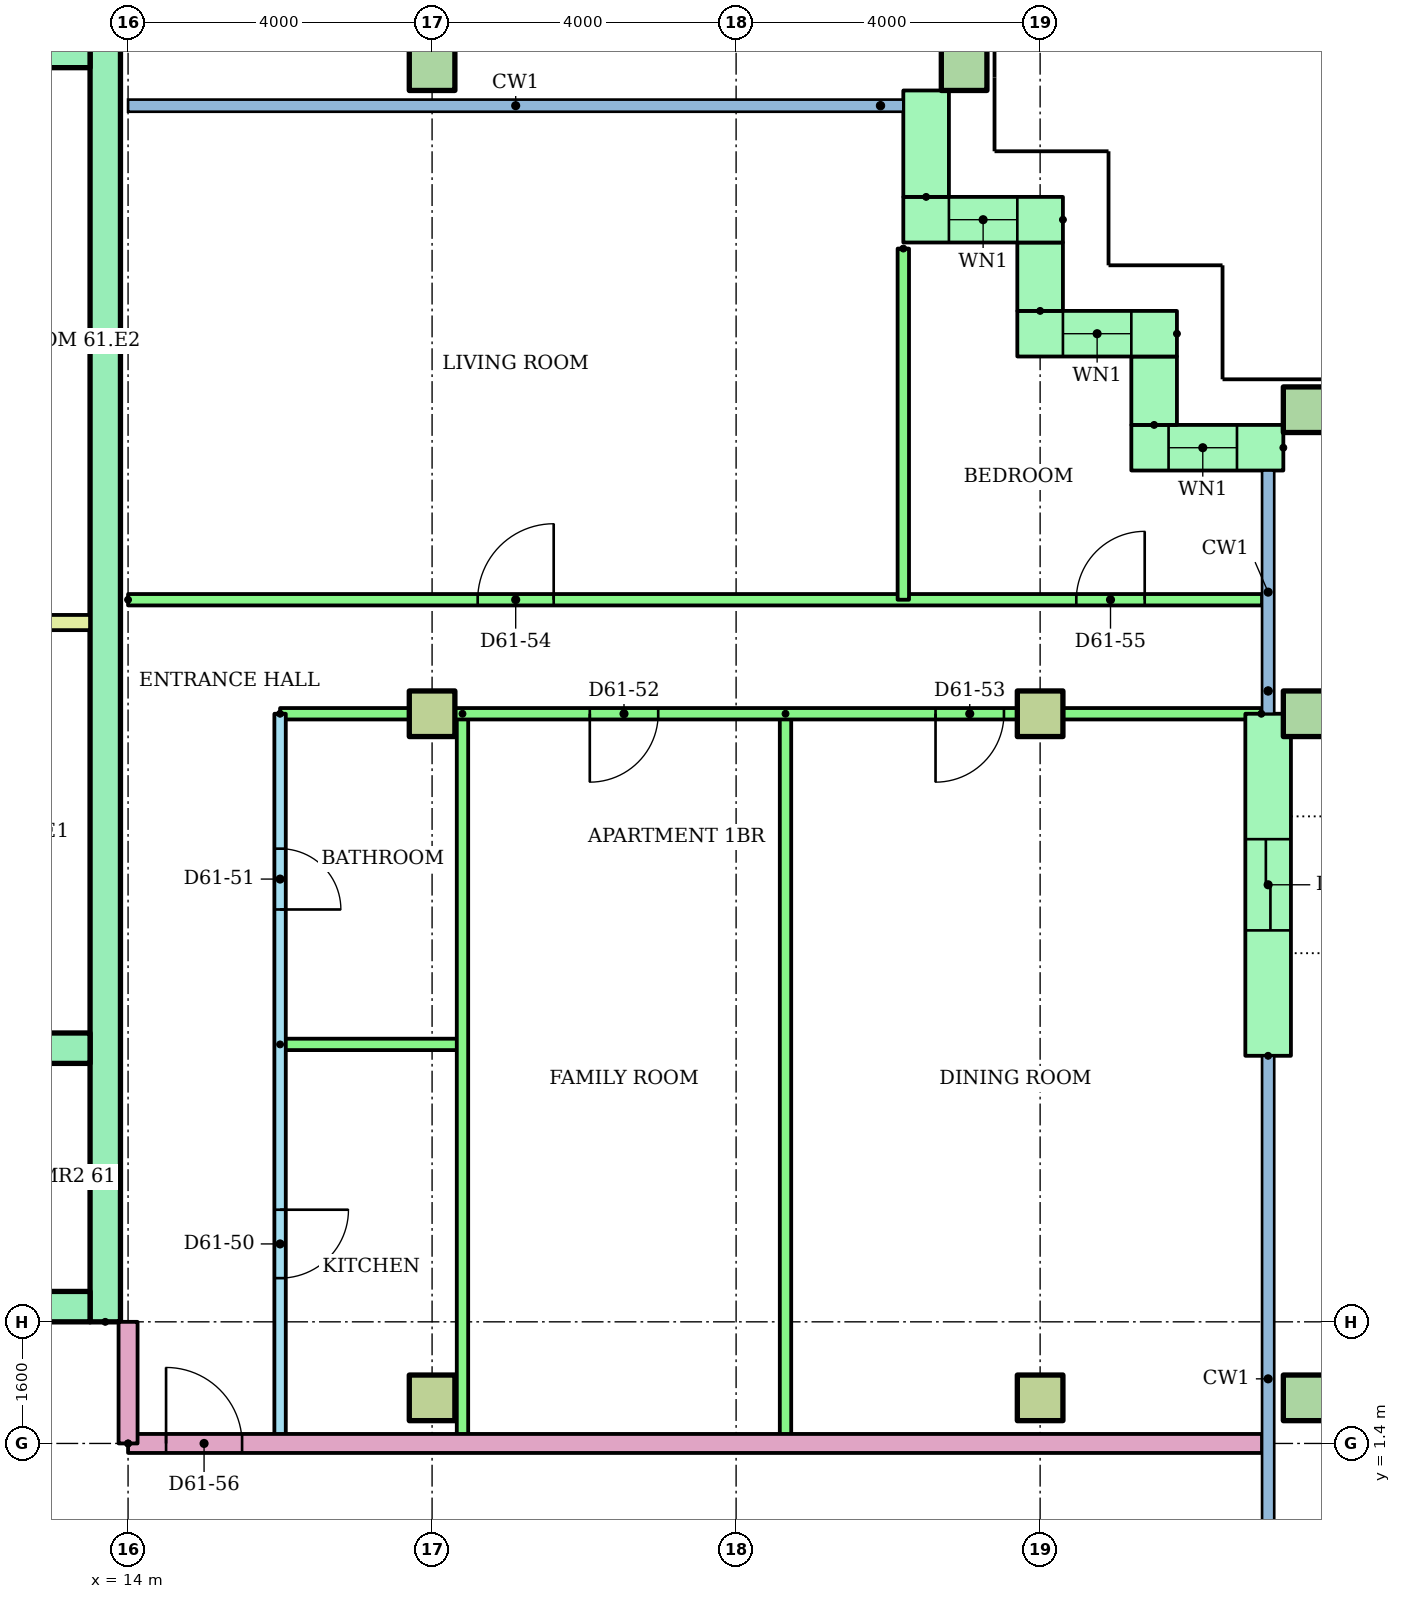
"""IFC4 building model, lengths in metres.
Left out: names, types, materials, properties, quantities, classifications, styles, units other than length and angle.
Written with IfcOpenShell. Run it as: python <this file> out.ifc"""

import sys

from ifc_helpers import new_model, si_unit, direction, frame, frame_2d, origin, origin_2d, place, context, subcontext, project, spatial, rectangle, hollow_rectangle, extrude, element, fill, save


model = new_model("IFC4")
c1 = context("Model", 3, precision=1e-05, world=origin(), true_north=direction((0.0, 1.0)))
c2 = subcontext(c1, "Body", "Model", "MODEL_VIEW")
j1 = project(units=[si_unit("LENGTHUNIT", "METRE"), si_unit("PLANEANGLEUNIT", "RADIAN")], contexts=[c1])
p1 = place(None, origin())
s1 = spatial("IfcSite", under=j1, at=p1, CompositionType="ELEMENT")
p2 = place(p1, origin())
s2 = spatial("IfcBuilding", under=s1, at=p2, CompositionType="ELEMENT")
p3 = place(p2, frame((0.0, 0.0, 233.2)))
s3 = spatial("IfcBuildingStorey", under=s2, at=p3, CompositionType="ELEMENT", Elevation=233.2)
for number, where in (
    (1, (18.0, 2.0, 0.0)),
    (2, (26.0, 2.0, 0.0)),
):
    element("IfcColumn", number, at=place(p3, frame(where)), inside=s3, PredefinedType="COLUMN", context=c2, shape_type="SweptSolid", body=[
        extrude(rectangle(XDim=0.6, YDim=0.6, at=origin_2d()), origin(), (0.0, 0.0, 1.0), 3.2),
    ])
p4 = place(p3, frame((29.5, 2.0, 0.0)))
e3 = element("IfcColumn", 3, at=p4, inside=s3, PredefinedType="COLUMN", context=c2, shape_type="SweptSolid", body=[
    extrude(hollow_rectangle(XDim=0.6, YDim=0.6, WallThickness=0.03, at=origin_2d()), origin(), (0.0, 0.0, 1.0), 3.2),
])
for number, where in (
    (4, (18.0, 11.0, 0.0)),
    (5, (26.0, 11.0, 0.0)),
):
    element("IfcColumn", number, at=place(p3, frame(where)), inside=s3, PredefinedType="COLUMN", context=c2, shape_type="SweptSolid", body=[
        extrude(rectangle(XDim=0.6, YDim=0.6, at=origin_2d()), origin(), (0.0, 0.0, 1.0), 3.2),
    ])
for number, where in (
    (6, (29.5, 11.0, 0.0)),
    (7, (29.5, 15.0, 0.0)),
    (8, (18.0, 19.5, 0.0)),
    (9, (25.0, 19.5, 0.0)),
):
    element("IfcColumn", number, at=place(p3, frame(where)), inside=s3, PredefinedType="COLUMN", context=c2, shape_type="SweptSolid", body=[
        extrude(hollow_rectangle(XDim=0.6, YDim=0.6, WallThickness=0.03, at=origin_2d()), origin(), (0.0, 0.0, 1.0), 3.2),
    ])
p5 = place(p3, frame((29.2, 14.5, 0.0), z_axis=(0.0, 0.0, 1.0), x_axis=(-1.0, 0.0, 0.0)))
e10 = element("IfcWall", 10, at=p5, inside=s3, PredefinedType="STANDARD", context=c2, shape_type="SweptSolid", body=[
    extrude(rectangle(XDim=2.0, YDim=0.6, at=frame_2d((1.0, 0.0))), origin(), (0.0, 0.0, 1.0), 2.92),
])
p6 = place(p5, frame((0.61, 0.0, 0.9)))
e11 = element("IfcOpeningElement", 11, at=p6, cuts=e10, PredefinedType="OPENING", context=c2, shape_type="SweptSolid", body=[
    extrude(rectangle(XDim=0.9, YDim=1.5, at=frame_2d((0.45, 0.75))), frame((0.0, 0.31, 0.0), z_axis=(0.0, -1.0, 0.0), x_axis=(1.0, 0.0, 0.0)), (0.0, 0.0, 1.0), 0.62),
])
p7 = place(p3, frame((27.5, 14.8, 0.0), z_axis=(0.0, 0.0, 1.0), x_axis=(0.0, 1.0, 0.0)))
e12 = element("IfcWall", 12, at=p7, inside=s3, PredefinedType="STANDARD", context=c2, shape_type="SweptSolid", body=[
    extrude(rectangle(XDim=0.9, YDim=0.6, at=frame_2d((0.45, 0.0))), origin(), (0.0, 0.0, 1.0), 2.92),
])
p8 = place(p3, frame((27.8, 16.0, 0.0), z_axis=(0.0, 0.0, 1.0), x_axis=(-1.0, 0.0, 0.0)))
e13 = element("IfcWall", 13, at=p8, inside=s3, PredefinedType="STANDARD", context=c2, shape_type="SweptSolid", body=[
    extrude(rectangle(XDim=2.1, YDim=0.6, at=frame_2d((1.05, 0.0))), origin(), (0.0, 0.0, 1.0), 2.92),
])
p9 = place(p8, frame((0.6, 0.0, 0.9)))
e14 = element("IfcOpeningElement", 14, at=p9, cuts=e13, PredefinedType="OPENING", context=c2, shape_type="SweptSolid", body=[
    extrude(rectangle(XDim=0.9, YDim=1.5, at=frame_2d((0.45, 0.75))), frame((0.0, 0.31, 0.0), z_axis=(0.0, -1.0, 0.0), x_axis=(1.0, 0.0, 0.0)), (0.0, 0.0, 1.0), 0.62),
])
p10 = place(p3, frame((26.0, 16.3, 0.0), z_axis=(0.0, 0.0, 1.0), x_axis=(0.0, 1.0, 0.0)))
e15 = element("IfcWall", 15, at=p10, inside=s3, PredefinedType="STANDARD", context=c2, shape_type="SweptSolid", body=[
    extrude(rectangle(XDim=0.9, YDim=0.6, at=frame_2d((0.45, 0.0))), origin(), (0.0, 0.0, 1.0), 2.92),
])
p11 = place(p3, frame((26.3, 17.5, 0.0), z_axis=(0.0, 0.0, 1.0), x_axis=(-1.0, 0.0, 0.0)))
e16 = element("IfcWall", 16, at=p11, inside=s3, PredefinedType="STANDARD", context=c2, shape_type="SweptSolid", body=[
    extrude(rectangle(XDim=2.1, YDim=0.6, at=frame_2d((1.05, 0.0))), origin(), (0.0, 0.0, 1.0), 2.92),
])
p12 = place(p11, frame((0.6, 0.0, 0.9)))
e17 = element("IfcOpeningElement", 17, at=p12, cuts=e16, PredefinedType="OPENING", context=c2, shape_type="SweptSolid", body=[
    extrude(rectangle(XDim=0.9, YDim=1.5, at=frame_2d((0.45, 0.75))), frame((0.0, 0.31, 0.0), z_axis=(0.0, -1.0, 0.0), x_axis=(1.0, 0.0, 0.0)), (0.0, 0.0, 1.0), 0.62),
])
p13 = place(p3, frame((24.5, 17.8, 0.0), z_axis=(0.0, 0.0, 1.0), x_axis=(0.0, 1.0, 0.0)))
e18 = element("IfcWall", 18, at=p13, inside=s3, PredefinedType="STANDARD", context=c2, shape_type="SweptSolid", body=[
    extrude(rectangle(XDim=1.4, YDim=0.6, at=frame_2d((0.7, 0.0))), origin(), (0.0, 0.0, 1.0), 2.92),
])
p14 = place(p3, frame((29.0, 6.5, 0.0), z_axis=(0.0, 0.0, 1.0), x_axis=(0.0, 1.0, 0.0)))
e19 = element("IfcWall", 19, at=p14, inside=s3, PredefinedType="STANDARD", context=c2, shape_type="SweptSolid", body=[
    extrude(rectangle(XDim=4.5, YDim=0.6, at=frame_2d((2.25, 0.0))), origin(), (0.0, 0.0, 1.0), 2.92),
])
p15 = place(p14, frame((1.65, 0.0, 0.0)))
e20 = element("IfcOpeningElement", 20, at=p15, cuts=e19, PredefinedType="OPENING", context=c2, shape_type="SweptSolid", body=[
    extrude(rectangle(XDim=1.2, YDim=2.1, at=frame_2d((0.6, 1.05))), frame((0.0, 0.31, 0.0), z_axis=(0.0, -1.0, 0.0), x_axis=(1.0, 0.0, 0.0)), (0.0, 0.0, 1.0), 0.62),
])
p16 = place(p3, frame((13.7, 3.0, 0.0), z_axis=(0.0, 0.0, 1.0), x_axis=(0.0, 1.0, 0.0)))
e21 = element("IfcWall", 21, at=p16, inside=s3, PredefinedType="SHEAR", context=c2, shape_type="SweptSolid", body=[
    extrude(rectangle(XDim=17.0, YDim=0.4, at=frame_2d((8.5, 0.0))), origin(), (0.0, 0.0, 1.0), 2.92),
])
p17 = place(p3, frame((-13.5, 19.7, 0.0)))
e22 = element("IfcWall", 22, at=p17, inside=s3, PredefinedType="SHEAR", context=c2, shape_type="SweptSolid", body=[
    extrude(rectangle(XDim=27.0, YDim=0.4, at=frame_2d((13.5, 0.0))), origin(), (0.0, 0.0, 1.0), 2.92),
])
p18 = place(p3, frame((-13.5, 3.2, 0.0)))
e23 = element("IfcWall", 23, at=p18, inside=s3, PredefinedType="SHEAR", context=c2, shape_type="SweptSolid", body=[
    extrude(rectangle(XDim=27.0, YDim=0.4, at=frame_2d((13.5, 0.0))), origin(), (0.0, 0.0, 1.0), 2.92),
])
p19 = place(p18, frame((22.083, 0.0, 0.0)))
e24 = element("IfcOpeningElement", 24, at=p19, cuts=e23, PredefinedType="OPENING", context=c2, shape_type="SweptSolid", body=[
    extrude(rectangle(XDim=1.1, YDim=2.1, at=frame_2d((0.55, 1.05))), frame((0.0, 0.21, 0.0), z_axis=(0.0, -1.0, 0.0), x_axis=(1.0, 0.0, 0.0)), (0.0, 0.0, 1.0), 0.42),
])
p20 = place(p18, frame((25.128, 0.0, 0.0)))
e25 = element("IfcOpeningElement", 25, at=p20, cuts=e23, PredefinedType="OPENING", context=c2, shape_type="SweptSolid", body=[
    extrude(rectangle(XDim=1.1, YDim=2.1, at=frame_2d((0.55, 1.05))), frame((0.0, 0.21, 0.0), z_axis=(0.0, -1.0, 0.0), x_axis=(1.0, 0.0, 0.0)), (0.0, 0.0, 1.0), 0.42),
])
p21 = place(p18, frame((12.6, 0.0, 0.0)))
e26 = element("IfcOpeningElement", 26, at=p21, cuts=e23, PredefinedType="OPENING", context=c2, shape_type="SweptSolid", body=[
    extrude(rectangle(XDim=1.8, YDim=2.1, at=frame_2d((0.9, 1.05))), frame((0.0, 0.21, 0.0), z_axis=(0.0, -1.0, 0.0), x_axis=(1.0, 0.0, 0.0)), (0.0, 0.0, 1.0), 0.42),
])
p22 = place(p3, frame((1.522, 6.6, 0.0)))
e27 = element("IfcWall", 27, at=p22, inside=s3, PredefinedType="SHEAR", context=c2, shape_type="SweptSolid", body=[
    extrude(rectangle(XDim=11.978, YDim=0.4, at=frame_2d((5.989, 0.0))), origin(), (0.0, 0.0, 1.0), 2.92),
])
p23 = place(p22, frame((2.544, 0.0, 0.0)))
e28 = element("IfcOpeningElement", 28, at=p23, cuts=e27, PredefinedType="OPENING", context=c2, shape_type="SweptSolid", body=[
    extrude(rectangle(XDim=1.0, YDim=2.1, at=frame_2d((0.5, 1.05))), frame((0.0, 0.21, 0.0), z_axis=(0.0, -1.0, 0.0), x_axis=(1.0, 0.0, 0.0)), (0.0, 0.0, 1.0), 0.42),
])
p24 = place(p3, frame((9.6, 12.2, 0.0)))
e29 = element("IfcWall", 29, at=p24, inside=s3, PredefinedType="PARTITIONING", context=c2, shape_type="SweptSolid", body=[
    extrude(rectangle(XDim=3.9, YDim=0.2, at=frame_2d((1.95, 0.0))), origin(), (0.0, 0.0, 1.0), 2.92),
])
p25 = place(p3, frame((16.0, 11.0, 0.0), z_axis=(0.0, 0.0, 1.0), x_axis=(0.0, -1.0, 0.0)))
e30 = element("IfcWall", 30, at=p25, inside=s3, PredefinedType="PARTITIONING", context=c2, shape_type="SweptSolid", body=[
    extrude(rectangle(XDim=9.6, YDim=0.15, at=frame_2d((4.8, 0.0))), origin(), (0.0, 0.0, 1.0), 2.4),
])
p26 = place(p25, frame((6.525, 0.0, 0.0)))
e31 = element("IfcOpeningElement", 31, at=p26, cuts=e30, PredefinedType="OPENING", context=c2, shape_type="SweptSolid", body=[
    extrude(rectangle(XDim=0.9, YDim=2.1, at=frame_2d((0.45, 1.05))), frame((0.0, 0.085, 0.0), z_axis=(0.0, -1.0, 0.0), x_axis=(1.0, 0.0, 0.0)), (0.0, 0.0, 1.0), 0.17),
])
p27 = place(p25, frame((1.775, 0.0, 0.0)))
e32 = element("IfcOpeningElement", 32, at=p27, cuts=e30, PredefinedType="OPENING", context=c2, shape_type="SweptSolid", body=[
    extrude(rectangle(XDim=0.8, YDim=2.1, at=frame_2d((0.4, 1.05))), frame((0.0, 0.085, 0.0), z_axis=(0.0, -1.0, 0.0), x_axis=(1.0, 0.0, 0.0)), (0.0, 0.0, 1.0), 0.17),
])
p28 = place(p3, frame((16.0, 6.65, 0.0)))
e33 = element("IfcWall", 33, at=p28, inside=s3, PredefinedType="PARTITIONING", context=c2, shape_type="SweptSolid", body=[
    extrude(rectangle(XDim=2.4, YDim=0.15, at=frame_2d((1.2, 0.0))), origin(), (0.0, 0.0, 1.0), 2.4),
])
for number, where, z_axis, x_axis in (
    (34, (18.4, 11.0, 0.0), (0.0, 0.0, 1.0), (0.0, -1.0, 0.0)),
    (35, (22.65, 11.0, 0.0), (0.0, 0.0, 1.0), (0.0, -1.0, 0.0)),
):
    element("IfcWall", number, at=place(p3, frame(where, z_axis=z_axis, x_axis=x_axis)), inside=s3, PredefinedType="PARTITIONING", context=c2, shape_type="SweptSolid", body=[
        extrude(rectangle(XDim=9.6, YDim=0.15, at=frame_2d((4.8, 0.0))), origin(), (0.0, 0.0, 1.0), 2.4),
    ])
p29 = place(p3, frame((28.91, 11.0, 0.0), z_axis=(0.0, 0.0, 1.0), x_axis=(-1.0, 0.0, 0.0)))
e36 = element("IfcWall", 36, at=p29, inside=s3, PredefinedType="PARTITIONING", context=c2, shape_type="SweptSolid", body=[
    extrude(rectangle(XDim=12.91, YDim=0.15, at=frame_2d((6.455, 0.0))), origin(), (0.0, 0.0, 1.0), 2.4),
])
p30 = place(p29, frame((7.935, 0.0, 0.0)))
e37 = element("IfcOpeningElement", 37, at=p30, cuts=e36, PredefinedType="OPENING", context=c2, shape_type="SweptSolid", body=[
    extrude(rectangle(XDim=0.9, YDim=2.1, at=frame_2d((0.45, 1.05))), frame((0.0, 0.085, 0.0), z_axis=(0.0, -1.0, 0.0), x_axis=(1.0, 0.0, 0.0)), (0.0, 0.0, 1.0), 0.17),
])
p31 = place(p29, frame((3.386, 0.0, 0.0)))
e38 = element("IfcOpeningElement", 38, at=p31, cuts=e36, PredefinedType="OPENING", context=c2, shape_type="SweptSolid", body=[
    extrude(rectangle(XDim=0.9, YDim=2.1, at=frame_2d((0.45, 1.05))), frame((0.0, 0.085, 0.0), z_axis=(0.0, -1.0, 0.0), x_axis=(1.0, 0.0, 0.0)), (0.0, 0.0, 1.0), 0.17),
])
p32 = place(p3, frame((14.0, 12.5, 0.0)))
e39 = element("IfcWall", 39, at=p32, inside=s3, PredefinedType="PARTITIONING", context=c2, shape_type="SweptSolid", body=[
    extrude(rectangle(XDim=14.92, YDim=0.15, at=frame_2d((7.46, 0.0))), origin(), (0.0, 0.0, 1.0), 2.4),
])
p33 = place(p32, frame((4.6, 0.0, 0.0)))
e40 = element("IfcOpeningElement", 40, at=p33, cuts=e39, PredefinedType="OPENING", context=c2, shape_type="SweptSolid", body=[
    extrude(rectangle(XDim=1.0, YDim=2.1, at=frame_2d((0.5, 1.05))), frame((0.0, 0.085, 0.0), z_axis=(0.0, -1.0, 0.0), x_axis=(1.0, 0.0, 0.0)), (0.0, 0.0, 1.0), 0.17),
])
p34 = place(p32, frame((12.476, 0.0, 0.0)))
e41 = element("IfcOpeningElement", 41, at=p34, cuts=e39, PredefinedType="OPENING", context=c2, shape_type="SweptSolid", body=[
    extrude(rectangle(XDim=0.9, YDim=2.1, at=frame_2d((0.45, 1.05))), frame((0.0, 0.085, 0.0), z_axis=(0.0, -1.0, 0.0), x_axis=(1.0, 0.0, 0.0)), (0.0, 0.0, 1.0), 0.17),
])
p35 = place(p3, frame((24.2, 17.12, 0.0), z_axis=(0.0, 0.0, 1.0), x_axis=(0.0, -1.0, 0.0)))
e42 = element("IfcWall", 42, at=p35, inside=s3, PredefinedType="PARTITIONING", context=c2, shape_type="SweptSolid", body=[
    extrude(rectangle(XDim=4.62, YDim=0.15, at=frame_2d((2.31, 0.0))), origin(), (0.0, 0.0, 1.0), 2.4),
])
p36 = place(p3, frame((14.0, 1.4, 0.0)))
e43 = element("IfcWall", 43, at=p36, inside=s3, PredefinedType="PARTITIONING", context=c2, shape_type="SweptSolid", body=[
    extrude(rectangle(XDim=14.92, YDim=0.25, at=frame_2d((7.46, 0.0))), origin(), (0.0, 0.0, 1.0), 2.4),
])
p37 = place(p36, frame((0.5, 0.0, 0.0)))
e44 = element("IfcOpeningElement", 44, at=p37, cuts=e43, PredefinedType="OPENING", context=c2, shape_type="SweptSolid", body=[
    extrude(rectangle(XDim=1.0, YDim=2.1, at=frame_2d((0.5, 1.05))), frame((0.0, 0.135, 0.0), z_axis=(0.0, -1.0, 0.0), x_axis=(1.0, 0.0, 0.0)), (0.0, 0.0, 1.0), 0.27),
])
p38 = place(p3, frame((14.0, 1.4, 0.0), z_axis=(0.0, 0.0, 1.0), x_axis=(0.0, 1.0, 0.0)))
e45 = element("IfcWall", 45, at=p38, inside=s3, PredefinedType="PARTITIONING", context=c2, shape_type="SweptSolid", body=[
    extrude(rectangle(XDim=1.6, YDim=0.25, at=frame_2d((0.8, 0.0))), origin(), (0.0, 0.0, 1.0), 2.4),
])
p39 = place(p6, origin())
e46 = element("IfcWindow", 46, at=p39, inside=s3, PartitioningType="SINGLE_PANEL", PredefinedType="WINDOW", context=c2, shape_type="SweptSolid", body=[
    extrude(rectangle(XDim=0.9, YDim=1.5, at=frame_2d((0.45, 0.75))), frame((0.0, 0.03, 0.0), z_axis=(0.0, -1.0, 0.0), x_axis=(1.0, 0.0, 0.0)), (0.0, 0.0, 1.0), 0.06),
])
fill(e11, e46)
p40 = place(p9, origin())
e47 = element("IfcWindow", 47, at=p40, inside=s3, PartitioningType="SINGLE_PANEL", PredefinedType="WINDOW", context=c2, shape_type="SweptSolid", body=[
    extrude(rectangle(XDim=0.9, YDim=1.5, at=frame_2d((0.45, 0.75))), frame((0.0, 0.03, 0.0), z_axis=(0.0, -1.0, 0.0), x_axis=(1.0, 0.0, 0.0)), (0.0, 0.0, 1.0), 0.06),
])
fill(e14, e47)
p41 = place(p12, origin())
e48 = element("IfcWindow", 48, at=p41, inside=s3, PartitioningType="SINGLE_PANEL", PredefinedType="WINDOW", context=c2, shape_type="SweptSolid", body=[
    extrude(rectangle(XDim=0.9, YDim=1.5, at=frame_2d((0.45, 0.75))), frame((0.0, 0.03, 0.0), z_axis=(0.0, -1.0, 0.0), x_axis=(1.0, 0.0, 0.0)), (0.0, 0.0, 1.0), 0.06),
])
fill(e17, e48)
p42 = place(p26, origin())
e49 = element("IfcDoor", 49, at=p42, inside=s3, OperationType="SINGLE_SWING_LEFT", PredefinedType="DOOR", context=c2, shape_type="SweptSolid", body=[
    extrude(rectangle(XDim=0.9, YDim=2.1, at=frame_2d((0.45, 1.05))), frame((0.0, 0.025, 0.0), z_axis=(0.0, -1.0, 0.0), x_axis=(1.0, 0.0, 0.0)), (0.0, 0.0, 1.0), 0.05),
])
fill(e31, e49)
p43 = place(p27, origin())
e50 = element("IfcDoor", 50, at=p43, inside=s3, OperationType="SINGLE_SWING_RIGHT", PredefinedType="DOOR", context=c2, shape_type="SweptSolid", body=[
    extrude(rectangle(XDim=0.8, YDim=2.1, at=frame_2d((0.4, 1.05))), frame((0.0, 0.025, 0.0), z_axis=(0.0, -1.0, 0.0), x_axis=(1.0, 0.0, 0.0)), (0.0, 0.0, 1.0), 0.05),
])
fill(e32, e50)
p44 = place(p30, origin())
e51 = element("IfcDoor", 51, at=p44, inside=s3, OperationType="SINGLE_SWING_RIGHT", PredefinedType="DOOR", context=c2, shape_type="SweptSolid", body=[
    extrude(rectangle(XDim=0.9, YDim=2.1, at=frame_2d((0.45, 1.05))), frame((0.0, 0.025, 0.0), z_axis=(0.0, -1.0, 0.0), x_axis=(1.0, 0.0, 0.0)), (0.0, 0.0, 1.0), 0.05),
])
fill(e37, e51)
p45 = place(p31, origin())
e52 = element("IfcDoor", 52, at=p45, inside=s3, OperationType="SINGLE_SWING_RIGHT", PredefinedType="DOOR", context=c2, shape_type="SweptSolid", body=[
    extrude(rectangle(XDim=0.9, YDim=2.1, at=frame_2d((0.45, 1.05))), frame((0.0, 0.025, 0.0), z_axis=(0.0, -1.0, 0.0), x_axis=(1.0, 0.0, 0.0)), (0.0, 0.0, 1.0), 0.05),
])
fill(e38, e52)
p46 = place(p33, origin())
e53 = element("IfcDoor", 53, at=p46, inside=s3, OperationType="SINGLE_SWING_RIGHT", PredefinedType="DOOR", context=c2, shape_type="SweptSolid", body=[
    extrude(rectangle(XDim=1.0, YDim=2.1, at=frame_2d((0.5, 1.05))), frame((0.0, 0.025, 0.0), z_axis=(0.0, -1.0, 0.0), x_axis=(1.0, 0.0, 0.0)), (0.0, 0.0, 1.0), 0.05),
])
fill(e40, e53)
p47 = place(p34, origin())
e54 = element("IfcDoor", 54, at=p47, inside=s3, OperationType="SINGLE_SWING_RIGHT", PredefinedType="DOOR", context=c2, shape_type="SweptSolid", body=[
    extrude(rectangle(XDim=0.9, YDim=2.1, at=frame_2d((0.45, 1.05))), frame((0.0, 0.025, 0.0), z_axis=(0.0, -1.0, 0.0), x_axis=(1.0, 0.0, 0.0)), (0.0, 0.0, 1.0), 0.05),
])
fill(e41, e54)
p48 = place(p37, origin())
e55 = element("IfcDoor", 55, at=p48, inside=s3, OperationType="SINGLE_SWING_LEFT", PredefinedType="DOOR", context=c2, shape_type="SweptSolid", body=[
    extrude(rectangle(XDim=1.0, YDim=2.1, at=frame_2d((0.5, 1.05))), frame((0.0, 0.025, 0.0), z_axis=(0.0, -1.0, 0.0), x_axis=(1.0, 0.0, 0.0)), (0.0, 0.0, 1.0), 0.05),
])
fill(e44, e55)
p49 = place(p15, origin())
e56 = element("IfcDoor", 56, at=p49, inside=s3, OperationType="SLIDING_TO_LEFT", PredefinedType="DOOR", context=c2, shape_type="SweptSolid", body=[
    extrude(rectangle(XDim=1.2, YDim=2.1, at=frame_2d((0.6, 1.05))), frame((0.0, 0.025, 0.0), z_axis=(0.0, -1.0, 0.0), x_axis=(1.0, 0.0, 0.0)), (0.0, 0.0, 1.0), 0.05),
])
fill(e20, e56)
save(model, sys.argv[1])
